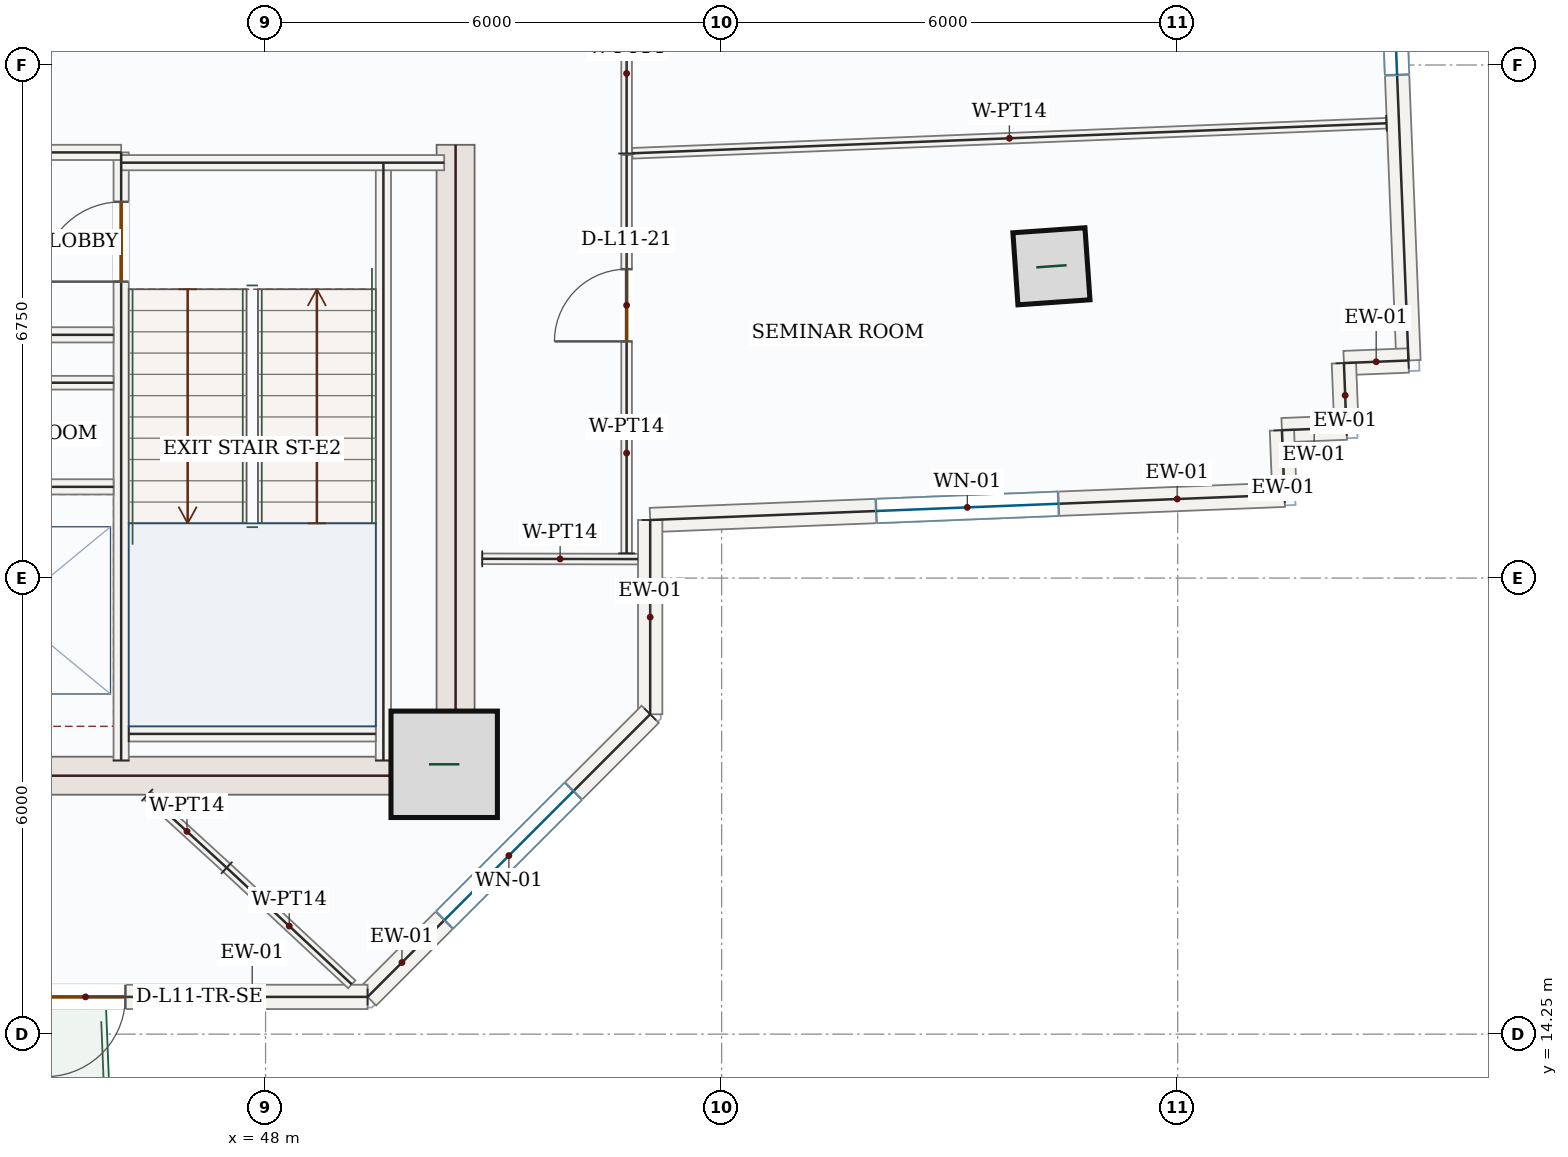
"""IFC4 building model, lengths in metres.
Left out: names, types, materials, properties, quantities, classifications, styles, units other than length and angle.
Written with IfcOpenShell. Run it as: python <this file> out.ifc"""

import sys

from ifc_helpers import new_model, si_unit, direction, frame, frame_2d, origin, origin_2d, place, context, subcontext, project, spatial, rectangle, hollow_rectangle, extrude, source, transform, mapped, element, fill, save


model = new_model("IFC4")
c1 = context("Model", 3, precision=1e-05, world=origin(), true_north=direction((0.0, 1.0)))
c2 = subcontext(c1, "Body", "Model", "MODEL_VIEW")
j1 = project(units=[si_unit("LENGTHUNIT", "METRE"), si_unit("PLANEANGLEUNIT", "RADIAN")], contexts=[c1])
p1 = place(None, origin())
s1 = spatial("IfcSite", under=j1, at=p1, CompositionType="ELEMENT")
p2 = place(p1, origin())
s2 = spatial("IfcBuilding", under=s1, at=p2, CompositionType="ELEMENT")
p3 = place(p2, frame((0.0, 0.0, 54.3)))
s3 = spatial("IfcBuildingStorey", under=s2, at=p3, CompositionType="ELEMENT", Elevation=54.3)
m1 = source(origin(), c2, "Body", "SweptSolid", [
    extrude(rectangle(XDim=8.55, YDim=0.5, at=frame_2d((4.275, 0.0))), origin(), (0.0, 0.0, 1.0), 3.95),
])
p4 = place(p3, frame((50.5, 17.4, 0.0), z_axis=(0.0, 0.0, 1.0), x_axis=(0.0, 1.0, 0.0)))
e1 = element("IfcWall", 1, at=p4, inside=s3, PredefinedType="SHEAR", context=c2, shape_type="MappedRepresentation", body=[
    mapped(m1, transform((0.0, 0.0, 0.0), x_axis=(1.0, 0.0, 0.0), y_axis=(0.0, 1.0, 0.0), z_axis=(0.0, 0.0, 1.0), scale=1.0)),
])
m2 = source(origin(), c2, "Body", "SweptSolid", [
    extrude(rectangle(XDim=7.0, YDim=0.5, at=frame_2d((3.5, 0.0))), origin(), (0.0, 0.0, 1.0), 3.95),
])
p5 = place(p3, frame((43.25, 17.65, 0.0), z_axis=(0.0, 0.0, 1.0), x_axis=(1.0, 0.0, 0.0)))
e2 = element("IfcWall", 2, at=p5, inside=s3, PredefinedType="SHEAR", context=c2, shape_type="MappedRepresentation", body=[
    mapped(m2, transform((0.0, 0.0, 0.0), x_axis=(1.0, 0.0, 0.0), y_axis=(0.0, 1.0, 0.0), z_axis=(0.0, 0.0, 1.0), scale=1.0)),
])
m3 = source(origin(), c2, "Body", "SweptSolid", [
    extrude(rectangle(XDim=1.4, YDim=1.4, at=origin_2d()), origin(), (0.0, 0.0, 1.0), 4.2),
])
p6 = place(p3, frame((50.35, 17.8, 0.0), z_axis=(0.0, 0.0, 1.0), x_axis=(1.0, 0.0, 0.0)))
e3 = element("IfcColumn", 3, at=p6, inside=s3, PredefinedType="COLUMN", context=c2, shape_type="MappedRepresentation", body=[
    mapped(m3, transform((0.0, 0.0, 0.0), x_axis=(1.0, 0.0, 0.0), y_axis=(0.0, 1.0, 0.0), z_axis=(0.0, 0.0, 1.0), scale=1.0)),
])
m4 = source(origin(), c2, "Body", "SweptSolid", [
    extrude(hollow_rectangle(XDim=0.95, YDim=0.95, WallThickness=0.05, at=origin_2d()), origin(), (0.0, 0.0, 1.0), 4.2),
])
p7 = place(p3, frame((58.339, 24.352, 0.0), z_axis=(0.0, 0.0, 1.0), x_axis=(0.99756405026, 0.069756473744, 0.0)))
e4 = element("IfcColumn", 4, at=p7, inside=s3, PredefinedType="COLUMN", context=c2, shape_type="MappedRepresentation", body=[
    mapped(m4, transform((0.0, 0.0, 0.0), x_axis=(1.0, 0.0, 0.0), y_axis=(0.0, 1.0, 0.0), z_axis=(0.0, 0.0, 1.0), scale=1.0)),
])
p8 = place(p3, frame((62.641, 33.025, 0.0), z_axis=(0.0, 0.0, 1.0), x_axis=(0.03977146366, -0.999208802342, 0.0)))
e5 = element("IfcWall", 5, at=p8, inside=s3, PredefinedType="SOLIDWALL", context=c2, shape_type="SweptSolid", body=[
    extrude(rectangle(XDim=9.92, YDim=0.32, at=frame_2d((4.96, 0.0))), origin(), (0.0, 0.0, 1.0), 3.95),
])
p9 = place(p8, frame((3.76, 0.0, 0.85)))
e6 = element("IfcOpeningElement", 6, at=p9, cuts=e5, PredefinedType="OPENING", context=c2, shape_type="SweptSolid", body=[
    extrude(rectangle(XDim=2.4, YDim=1.8, at=frame_2d((1.2, 0.9))), frame((0.0, 0.17, 0.0), z_axis=(0.0, -1.0, 0.0), x_axis=(1.0, 0.0, 0.0)), (0.0, 0.0, 1.0), 0.34),
])
m5 = source(origin(), c2, "Body", "SweptSolid", [
    extrude(rectangle(XDim=0.85, YDim=0.32, at=frame_2d((0.425, 0.0))), origin(), (0.0, 0.0, 1.0), 3.95),
])
p10 = place(p3, frame((63.036, 23.113, 0.0), z_axis=(0.0, 0.0, 1.0), x_axis=(-0.999202334929, -0.039933618331, 0.0)))
e7 = element("IfcWall", 7, at=p10, inside=s3, PredefinedType="SOLIDWALL", context=c2, shape_type="MappedRepresentation", body=[
    mapped(m5, transform((0.0, 0.0, 0.0), x_axis=(1.0, 0.0, 0.0), y_axis=(0.0, 1.0, 0.0), z_axis=(0.0, 0.0, 1.0), scale=1.0)),
])
m6 = source(origin(), c2, "Body", "SweptSolid", [
    extrude(rectangle(XDim=0.85, YDim=0.32, at=frame_2d((0.425, 0.0))), origin(), (0.0, 0.0, 1.0), 3.95),
])
for number, where, z_axis, x_axis in (
    (8, (62.187, 23.079, 0.0), (0.0, 0.0, 1.0), (0.04, -0.999, 0.0)),
    (9, (62.22, 22.229, 0.0), (0.0, 0.0, 1.0), (-0.999, -0.04, 0.0)),
    (10, (61.371, 22.196, 0.0), (0.0, 0.0, 1.0), (0.04, -0.999, 0.0)),
):
    element("IfcWall", number, at=place(p3, frame(where, z_axis=z_axis, x_axis=x_axis)), inside=s3, PredefinedType="SOLIDWALL", context=c2, shape_type="MappedRepresentation", body=[
        mapped(m6, transform((0.0, 0.0, 0.0), x_axis=(1.0, 0.0, 0.0), y_axis=(0.0, 1.0, 0.0), z_axis=(0.0, 0.0, 1.0), scale=1.0)),
    ])
p11 = place(p3, frame((61.405, 21.346, 0.0), z_axis=(0.0, 0.0, 1.0), x_axis=(-0.999208226989, -0.039785916063, 0.0)))
e11 = element("IfcWall", 11, at=p11, inside=s3, PredefinedType="SOLIDWALL", context=c2, shape_type="SweptSolid", body=[
    extrude(rectangle(XDim=8.352, YDim=0.32, at=frame_2d((4.176, 0.0))), origin(), (0.0, 0.0, 1.0), 3.95),
])
p12 = place(p11, frame((2.976, 0.0, 0.85)))
e12 = element("IfcOpeningElement", 12, at=p12, cuts=e11, PredefinedType="OPENING", context=c2, shape_type="SweptSolid", body=[
    extrude(rectangle(XDim=2.4, YDim=1.8, at=frame_2d((1.2, 0.9))), frame((0.0, 0.17, 0.0), z_axis=(0.0, -1.0, 0.0), x_axis=(1.0, 0.0, 0.0)), (0.0, 0.0, 1.0), 0.34),
])
m7 = source(origin(), c2, "Body", "SweptSolid", [
    extrude(rectangle(XDim=2.556, YDim=0.32, at=frame_2d((1.278, 0.0))), origin(), (0.0, 0.0, 1.0), 3.95),
])
p13 = place(p3, frame((53.06, 21.014, 0.0), z_axis=(0.0, 0.0, 1.0), x_axis=(0.0, -1.0, 0.0)))
e13 = element("IfcWall", 13, at=p13, inside=s3, PredefinedType="SOLIDWALL", context=c2, shape_type="MappedRepresentation", body=[
    mapped(m7, transform((0.0, 0.0, 0.0), x_axis=(1.0, 0.0, 0.0), y_axis=(0.0, 1.0, 0.0), z_axis=(0.0, 0.0, 1.0), scale=1.0)),
])
p14 = place(p3, frame((53.06, 18.458, 0.0), z_axis=(0.0, 0.0, 1.0), x_axis=(-0.707106781187, -0.707106781187, 0.0)))
e14 = element("IfcWall", 14, at=p14, inside=s3, PredefinedType="SOLIDWALL", context=c2, shape_type="SweptSolid", body=[
    extrude(rectangle(XDim=5.258, YDim=0.32, at=frame_2d((2.629, 0.0))), origin(), (0.0, 0.0, 1.0), 3.95),
])
p15 = place(p14, frame((1.429, 0.0, 0.85)))
e15 = element("IfcOpeningElement", 15, at=p15, cuts=e14, PredefinedType="OPENING", context=c2, shape_type="SweptSolid", body=[
    extrude(rectangle(XDim=2.4, YDim=1.8, at=frame_2d((1.2, 0.9))), frame((0.0, 0.17, 0.0), z_axis=(0.0, -1.0, 0.0), x_axis=(1.0, 0.0, 0.0)), (0.0, 0.0, 1.0), 0.34),
])
p16 = place(p3, frame((49.342, 14.74, 0.0), z_axis=(0.0, 0.0, 1.0), x_axis=(-1.0, 0.0, 0.0)))
e16 = element("IfcWall", 16, at=p16, inside=s3, PredefinedType="SOLIDWALL", context=c2, shape_type="SweptSolid", body=[
    extrude(rectangle(XDim=6.189, YDim=0.32, at=frame_2d((3.094, 0.0))), origin(), (0.0, 0.0, 1.0), 3.95),
])
p17 = place(p16, frame((3.186, 0.0, 0.0)))
e17 = element("IfcOpeningElement", 17, at=p17, cuts=e16, PredefinedType="OPENING", context=c2, shape_type="SweptSolid", body=[
    extrude(rectangle(XDim=1.05, YDim=2.15, at=frame_2d((0.525, 1.075))), frame((0.0, 0.17, 0.0), z_axis=(0.0, -1.0, 0.0), x_axis=(1.0, 0.0, 0.0)), (0.0, 0.0, 1.0), 0.34),
])
m8 = source(origin(), c2, "Body", "SweptSolid", [
    extrude(rectangle(XDim=7.87, YDim=0.2, at=frame_2d((3.935, 0.0))), origin(), (0.0, 0.0, 1.0), 3.95),
])
p18 = place(p3, frame((49.55, 17.85, 0.0), z_axis=(0.0, 0.0, 1.0), x_axis=(0.0, 1.0, 0.0)))
e18 = element("IfcWall", 18, at=p18, inside=s3, PredefinedType="SOLIDWALL", context=c2, shape_type="MappedRepresentation", body=[
    mapped(m8, transform((0.0, 0.0, 0.0), x_axis=(1.0, 0.0, 0.0), y_axis=(0.0, 1.0, 0.0), z_axis=(0.0, 0.0, 1.0), scale=1.0)),
])
p19 = place(p3, frame((46.1, 17.85, 0.0), z_axis=(0.0, 0.0, 1.0), x_axis=(0.0, 1.0, 0.0)))
e19 = element("IfcWall", 19, at=p19, inside=s3, PredefinedType="SOLIDWALL", context=c2, shape_type="SweptSolid", body=[
    extrude(rectangle(XDim=8.0, YDim=0.2, at=frame_2d((4.0, 0.0))), origin(), (0.0, 0.0, 1.0), 3.95),
])
p20 = place(p19, frame((6.3, 0.0, 0.0)))
e20 = element("IfcOpeningElement", 20, at=p20, cuts=e19, PredefinedType="OPENING", context=c2, shape_type="SweptSolid", body=[
    extrude(rectangle(XDim=1.05, YDim=2.15, at=frame_2d((0.525, 1.075))), frame((0.0, 0.11, 0.0), z_axis=(0.0, -1.0, 0.0), x_axis=(1.0, 0.0, 0.0)), (0.0, 0.0, 1.0), 0.22),
])
m9 = source(origin(), c2, "Body", "SweptSolid", [
    extrude(rectangle(XDim=3.0, YDim=0.2, at=frame_2d((1.5, 0.0))), origin(), (0.0, 0.0, 1.0), 3.95),
])
p21 = place(p3, frame((43.1, 25.85, 0.0), z_axis=(0.0, 0.0, 1.0), x_axis=(1.0, 0.0, 0.0)))
e21 = element("IfcWall", 21, at=p21, inside=s3, PredefinedType="SOLIDWALL", context=c2, shape_type="MappedRepresentation", body=[
    mapped(m9, transform((0.0, 0.0, 0.0), x_axis=(1.0, 0.0, 0.0), y_axis=(0.0, 1.0, 0.0), z_axis=(0.0, 0.0, 1.0), scale=1.0)),
])
m10 = source(origin(), c2, "Body", "SweptSolid", [
    extrude(rectangle(XDim=4.25, YDim=0.2, at=frame_2d((2.125, 0.0))), origin(), (0.0, 0.0, 1.0), 3.95),
])
p22 = place(p3, frame((46.1, 25.715, 0.0), z_axis=(0.0, 0.0, 1.0), x_axis=(1.0, 0.0, 0.0)))
e22 = element("IfcWall", 22, at=p22, inside=s3, PredefinedType="SOLIDWALL", context=c2, shape_type="MappedRepresentation", body=[
    mapped(m10, transform((0.0, 0.0, 0.0), x_axis=(1.0, 0.0, 0.0), y_axis=(0.0, 1.0, 0.0), z_axis=(0.0, 0.0, 1.0), scale=1.0)),
])
m11 = source(origin(), c2, "Body", "SweptSolid", [
    extrude(rectangle(XDim=3.25, YDim=0.2, at=frame_2d((1.625, 0.0))), origin(), (0.0, 0.0, 1.0), 3.95),
])
p23 = place(p3, frame((46.2, 18.2, 0.0), z_axis=(0.0, 0.0, 1.0), x_axis=(1.0, 0.0, 0.0)))
e23 = element("IfcWall", 23, at=p23, inside=s3, PredefinedType="SOLIDWALL", context=c2, shape_type="MappedRepresentation", body=[
    mapped(m11, transform((0.0, 0.0, 0.0), x_axis=(1.0, 0.0, 0.0), y_axis=(0.0, 1.0, 0.0), z_axis=(0.0, 0.0, 1.0), scale=1.0)),
])
m12 = source(origin(), c2, "Body", "SweptSolid", [
    extrude(rectangle(XDim=2.75, YDim=0.2, at=frame_2d((1.375, 0.0))), origin(), (0.0, 0.0, 1.0), 3.95),
])
for number, where, z_axis, x_axis in (
    (24, (43.25, 23.45, 0.0), (0.0, 0.0, 1.0), (1.0, 0.0, 0.0)),
    (25, (43.25, 21.45, 0.0), (0.0, 0.0, 1.0), (1.0, 0.0, 0.0)),
):
    element("IfcWall", number, at=place(p3, frame(where, z_axis=z_axis, x_axis=x_axis)), inside=s3, PredefinedType="SOLIDWALL", context=c2, shape_type="MappedRepresentation", body=[
        mapped(m12, transform((0.0, 0.0, 0.0), x_axis=(1.0, 0.0, 0.0), y_axis=(0.0, 1.0, 0.0), z_axis=(0.0, 0.0, 1.0), scale=1.0)),
    ])
m13 = source(origin(), c2, "Body", "SweptSolid", [
    extrude(rectangle(XDim=2.75, YDim=0.18, at=frame_2d((1.375, 0.0))), origin(), (0.0, 0.0, 1.0), 3.95),
])
p24 = place(p3, frame((43.25, 22.82, 0.0), z_axis=(0.0, 0.0, 1.0), x_axis=(1.0, 0.0, 0.0)))
e26 = element("IfcWall", 26, at=p24, inside=s3, PredefinedType="PARTITIONING", context=c2, shape_type="MappedRepresentation", body=[
    mapped(m13, transform((0.0, 0.0, 0.0), x_axis=(1.0, 0.0, 0.0), y_axis=(0.0, 1.0, 0.0), z_axis=(0.0, 0.0, 1.0), scale=1.0)),
])
p25 = place(p3, frame((52.75, 25.835, 0.0), z_axis=(0.0, 0.0, 1.0), x_axis=(0.0, 1.0, 0.0)))
e27 = element("IfcWall", 27, at=p25, inside=s3, PredefinedType="PARTITIONING", context=c2, shape_type="SweptSolid", body=[
    extrude(rectangle(XDim=3.843, YDim=0.14, at=frame_2d((1.921, 0.0))), origin(), (0.0, 0.0, 1.0), 3.95),
])
p26 = place(p25, frame((2.257, 0.0, 0.0)))
e28 = element("IfcOpeningElement", 28, at=p26, cuts=e27, PredefinedType="OPENING", context=c2, shape_type="SweptSolid", body=[
    extrude(rectangle(XDim=0.95, YDim=2.15, at=frame_2d((0.475, 1.075))), frame((0.0, 0.08, 0.0), z_axis=(0.0, -1.0, 0.0), x_axis=(1.0, 0.0, 0.0)), (0.0, 0.0, 1.0), 0.16),
])
m14 = source(origin(), c2, "Body", "SweptSolid", [
    extrude(rectangle(XDim=9.929, YDim=0.14, at=frame_2d((4.965, 0.0))), origin(), (0.0, 0.0, 1.0), 3.95),
])
p27 = place(p3, frame((62.747, 26.233, 0.0), z_axis=(0.0, 0.0, 1.0), x_axis=(-0.999208364847, -0.039782453661, 0.0)))
e29 = element("IfcWall", 29, at=p27, inside=s3, PredefinedType="PARTITIONING", context=c2, shape_type="MappedRepresentation", body=[
    mapped(m14, transform((0.0, 0.0, 0.0), x_axis=(1.0, 0.0, 0.0), y_axis=(0.0, 1.0, 0.0), z_axis=(0.0, 0.0, 1.0), scale=1.0)),
])
m15 = source(origin(), c2, "Body", "SweptSolid", [
    extrude(rectangle(XDim=1.417, YDim=0.14, at=frame_2d((0.708, 0.0))), origin(), (0.0, 0.0, 1.0), 3.95),
])
p28 = place(p3, frame((46.443, 17.395, 0.0), z_axis=(0.0, 0.0, 1.0), x_axis=(0.737776192982, -0.675045397784, 0.0)))
e30 = element("IfcWall", 30, at=p28, inside=s3, PredefinedType="PARTITIONING", context=c2, shape_type="MappedRepresentation", body=[
    mapped(m15, transform((0.0, 0.0, 0.0), x_axis=(1.0, 0.0, 0.0), y_axis=(0.0, 1.0, 0.0), z_axis=(0.0, 0.0, 1.0), scale=1.0)),
])
m16 = source(origin(), c2, "Body", "SweptSolid", [
    extrude(rectangle(XDim=2.25, YDim=0.14, at=frame_2d((1.125, 0.0))), origin(), (0.0, 0.0, 1.0), 3.95),
])
p29 = place(p3, frame((47.489, 16.439, 0.0), z_axis=(0.0, 0.0, 1.0), x_axis=(0.731524295554, -0.68181537458, 0.0)))
e31 = element("IfcWall", 31, at=p29, inside=s3, PredefinedType="PARTITIONING", context=c2, shape_type="MappedRepresentation", body=[
    mapped(m16, transform((0.0, 0.0, 0.0), x_axis=(1.0, 0.0, 0.0), y_axis=(0.0, 1.0, 0.0), z_axis=(0.0, 0.0, 1.0), scale=1.0)),
])
m17 = source(origin(), c2, "Body", "SweptSolid", [
    extrude(rectangle(XDim=2.049, YDim=0.14, at=frame_2d((1.025, 0.0))), origin(), (0.0, 0.0, 1.0), 3.95),
])
p30 = place(p3, frame((50.851, 20.503, 0.0), z_axis=(0.0, 0.0, 1.0), x_axis=(0.999998403336, -0.001786987854, 0.0)))
e32 = element("IfcWall", 32, at=p30, inside=s3, PredefinedType="PARTITIONING", context=c2, shape_type="MappedRepresentation", body=[
    mapped(m17, transform((0.0, 0.0, 0.0), x_axis=(1.0, 0.0, 0.0), y_axis=(0.0, 1.0, 0.0), z_axis=(0.0, 0.0, 1.0), scale=1.0)),
])
p31 = place(p3, frame((52.75, 20.575, 0.0), z_axis=(0.0, 0.0, 1.0), x_axis=(0.0, 1.0, 0.0)))
e33 = element("IfcWall", 33, at=p31, inside=s3, PredefinedType="PARTITIONING", context=c2, shape_type="SweptSolid", body=[
    extrude(rectangle(XDim=5.24, YDim=0.14, at=frame_2d((2.62, 0.0))), origin(), (0.0, 0.0, 1.0), 3.95),
])
p32 = place(p31, frame((2.789, 0.0, 0.0)))
e34 = element("IfcOpeningElement", 34, at=p32, cuts=e33, PredefinedType="OPENING", context=c2, shape_type="SweptSolid", body=[
    extrude(rectangle(XDim=0.95, YDim=2.15, at=frame_2d((0.475, 1.075))), frame((0.0, 0.08, 0.0), z_axis=(0.0, -1.0, 0.0), x_axis=(1.0, 0.0, 0.0)), (0.0, 0.0, 1.0), 0.16),
])
m18 = source(origin(), c2, "Body", "SweptSolid", [
    extrude(rectangle(XDim=2.4, YDim=1.8, at=frame_2d((1.2, 0.9))), frame((0.0, 0.03, 0.0), z_axis=(0.0, -1.0, 0.0), x_axis=(1.0, 0.0, 0.0)), (0.0, 0.0, 1.0), 0.06),
])
p33 = place(p9, origin())
e35 = element("IfcWindow", 35, at=p33, inside=s3, PartitioningType="DOUBLE_PANEL_VERTICAL", PredefinedType="WINDOW", context=c2, shape_type="MappedRepresentation", body=[
    mapped(m18, transform((0.0, 0.0, 0.0), x_axis=(1.0, 0.0, 0.0), y_axis=(0.0, 1.0, 0.0), z_axis=(0.0, 0.0, 1.0), scale=1.0)),
])
fill(e6, e35)
p34 = place(p12, origin())
e36 = element("IfcWindow", 36, at=p34, inside=s3, PartitioningType="DOUBLE_PANEL_VERTICAL", PredefinedType="WINDOW", context=c2, shape_type="MappedRepresentation", body=[
    mapped(m18, transform((0.0, 0.0, 0.0), x_axis=(1.0, 0.0, 0.0), y_axis=(0.0, 1.0, 0.0), z_axis=(0.0, 0.0, 1.0), scale=1.0)),
])
fill(e12, e36)
p35 = place(p15, origin())
e37 = element("IfcWindow", 37, at=p35, inside=s3, PartitioningType="DOUBLE_PANEL_VERTICAL", PredefinedType="WINDOW", context=c2, shape_type="MappedRepresentation", body=[
    mapped(m18, transform((0.0, 0.0, 0.0), x_axis=(1.0, 0.0, 0.0), y_axis=(0.0, 1.0, 0.0), z_axis=(0.0, 0.0, 1.0), scale=1.0)),
])
fill(e15, e37)
m19 = source(origin(), c2, "Body", "SweptSolid", [
    extrude(rectangle(XDim=1.05, YDim=2.15, at=frame_2d((0.525, 1.075))), frame((0.0, 0.025, 0.0), z_axis=(0.0, -1.0, 0.0), x_axis=(1.0, 0.0, 0.0)), (0.0, 0.0, 1.0), 0.05),
])
p36 = place(p17, origin())
e38 = element("IfcDoor", 38, at=p36, inside=s3, OperationType="SINGLE_SWING_RIGHT", PredefinedType="DOOR", context=c2, shape_type="MappedRepresentation", body=[
    mapped(m19, transform((0.0, 0.0, 0.0), x_axis=(1.0, 0.0, 0.0), y_axis=(0.0, 1.0, 0.0), z_axis=(0.0, 0.0, 1.0), scale=1.0)),
])
fill(e17, e38)
p37 = place(p20, origin())
e39 = element("IfcDoor", 39, at=p37, inside=s3, OperationType="SINGLE_SWING_LEFT", PredefinedType="DOOR", context=c2, shape_type="MappedRepresentation", body=[
    mapped(m19, transform((0.0, 0.0, 0.0), x_axis=(1.0, 0.0, 0.0), y_axis=(0.0, 1.0, 0.0), z_axis=(0.0, 0.0, 1.0), scale=1.0)),
])
fill(e20, e39)
m20 = source(origin(), c2, "Body", "SweptSolid", [
    extrude(rectangle(XDim=0.95, YDim=2.15, at=frame_2d((0.475, 1.075))), frame((0.0, 0.025, 0.0), z_axis=(0.0, -1.0, 0.0), x_axis=(1.0, 0.0, 0.0)), (0.0, 0.0, 1.0), 0.05),
])
p38 = place(p32, origin())
e40 = element("IfcDoor", 40, at=p38, inside=s3, OperationType="SINGLE_SWING_LEFT", PredefinedType="DOOR", context=c2, shape_type="MappedRepresentation", body=[
    mapped(m20, transform((0.0, 0.0, 0.0), x_axis=(1.0, 0.0, 0.0), y_axis=(0.0, 1.0, 0.0), z_axis=(0.0, 0.0, 1.0), scale=1.0)),
])
fill(e34, e40)
save(model, sys.argv[1])
